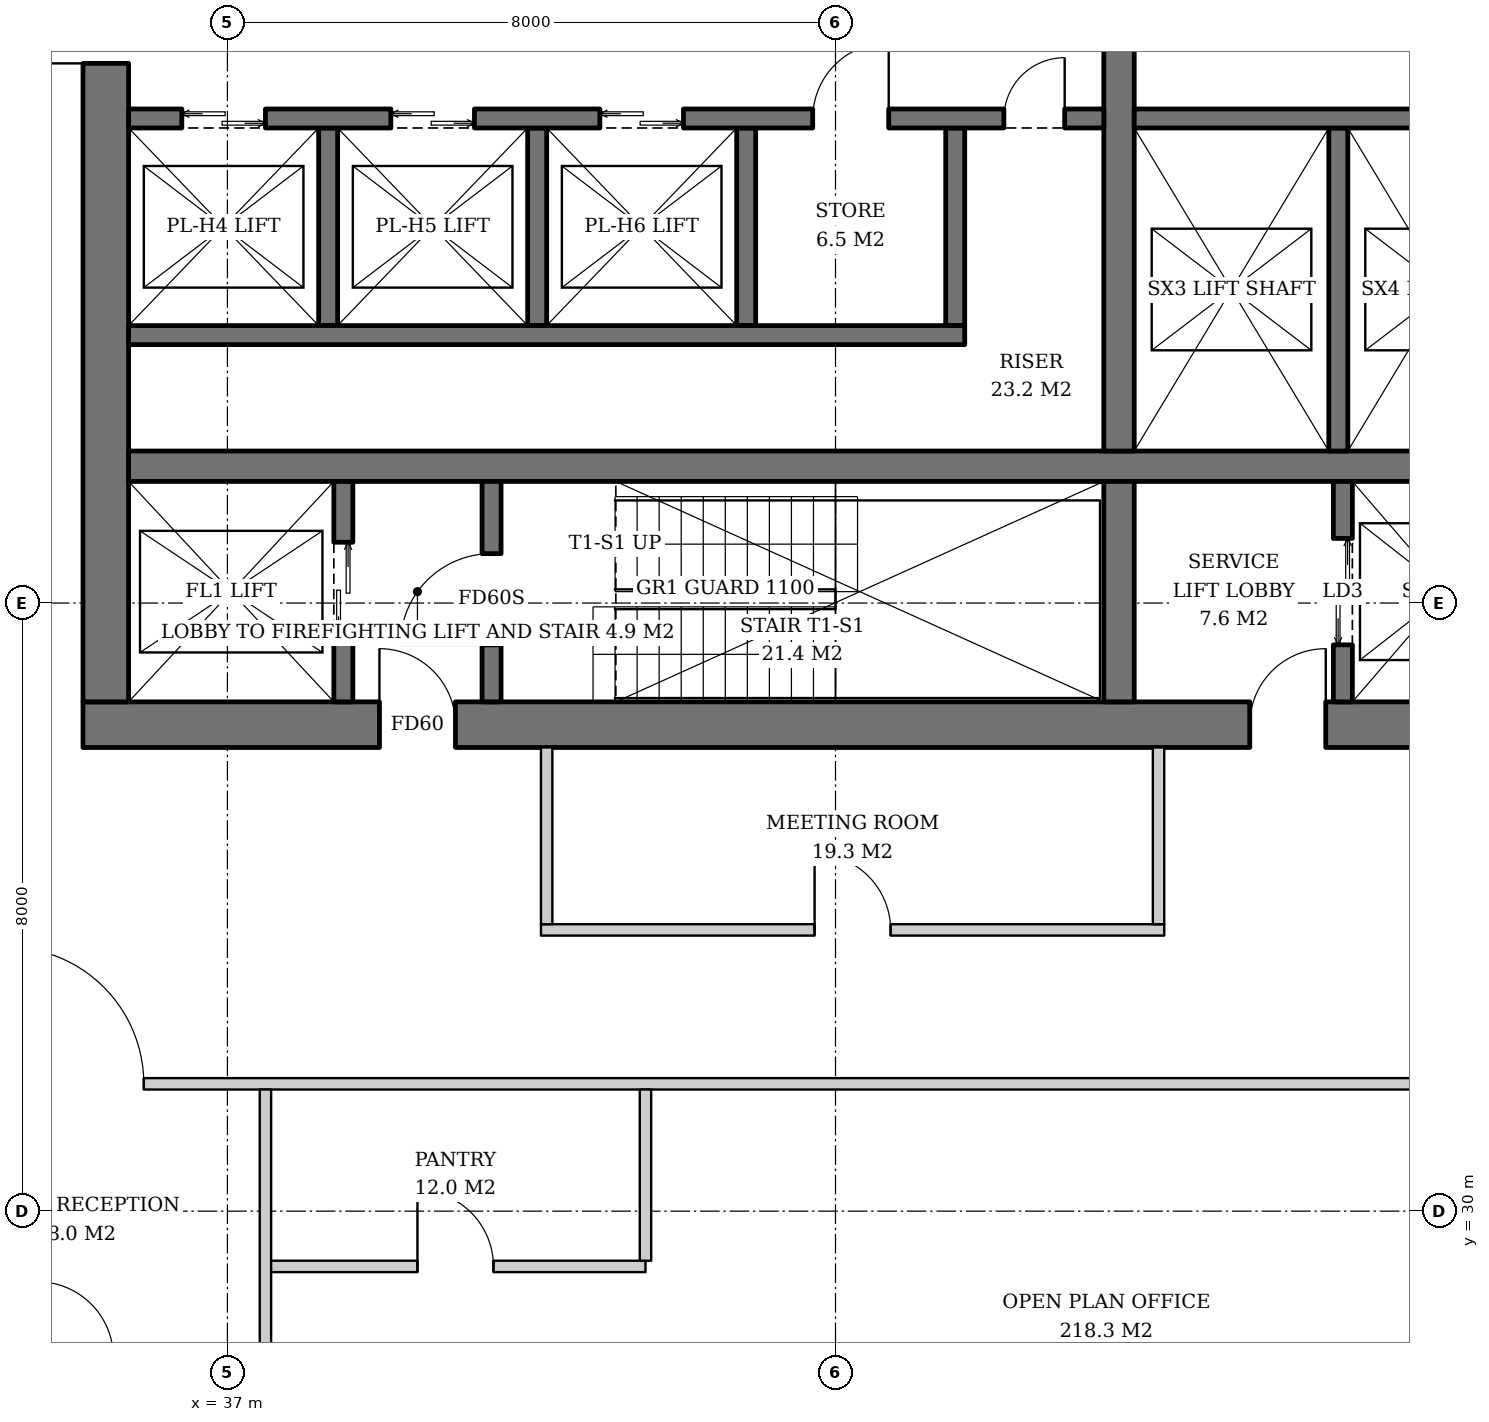
"""IFC4 building model, lengths in metres.
Left out: names, types, materials, properties, quantities, classifications, styles, units other than length and angle.
Written with IfcOpenShell. Run it as: python <this file> out.ifc"""

import sys

from ifc_helpers import new_model, si_unit, direction, frame, frame_2d, origin, place, context, subcontext, project, spatial, rectangle, extrude, element, fill, save


model = new_model("IFC4")
c1 = context("Model", 3, precision=1e-05, world=origin(), true_north=direction((0.0, 1.0)))
c2 = subcontext(c1, "Body", "Model", "MODEL_VIEW")
j1 = project(units=[si_unit("LENGTHUNIT", "METRE"), si_unit("PLANEANGLEUNIT", "RADIAN")], contexts=[c1])
p1 = place(None, origin())
s1 = spatial("IfcSite", under=j1, at=p1, CompositionType="ELEMENT")
p2 = place(p1, origin())
s2 = spatial("IfcBuilding", under=s1, at=p2, CompositionType="ELEMENT")
p3 = place(p2, frame((0.0, 0.0, 173.0)))
s3 = spatial("IfcBuildingStorey", under=s2, at=p3, CompositionType="ELEMENT", Elevation=173.0)
p4 = place(p3, frame((35.1, 36.4, 0.0), z_axis=(0.0, 0.0, 1.0), x_axis=(1.0, 0.0, 0.0)))
e1 = element("IfcWall", 1, at=p4, inside=s3, PredefinedType="SHEAR", context=c2, shape_type="SweptSolid", body=[
    extrude(rectangle(XDim=19.8, YDim=0.6, at=frame_2d((9.9, 0.0))), origin(), (0.0, 0.0, 1.0), 3.8),
])
p5 = place(p4, frame((3.9, 0.0, 0.0)))
e2 = element("IfcOpeningElement", 2, at=p5, cuts=e1, PredefinedType="OPENING", context=c2, shape_type="SweptSolid", body=[
    extrude(rectangle(XDim=1.0, YDim=2.1, at=frame_2d((0.5, 1.05))), frame((0.0, 0.31, 0.0), z_axis=(0.0, -1.0, 0.0), x_axis=(1.0, 0.0, 0.0)), (0.0, 0.0, 1.0), 0.62),
])
p6 = place(p4, frame((15.35, 0.0, 0.0)))
e3 = element("IfcOpeningElement", 3, at=p6, cuts=e1, PredefinedType="OPENING", context=c2, shape_type="SweptSolid", body=[
    extrude(rectangle(XDim=1.0, YDim=2.1, at=frame_2d((0.5, 1.05))), frame((0.0, 0.31, 0.0), z_axis=(0.0, -1.0, 0.0), x_axis=(1.0, 0.0, 0.0)), (0.0, 0.0, 1.0), 0.62),
])
p7 = place(p3, frame((35.4, 36.7, 0.0), z_axis=(0.0, 0.0, 1.0), x_axis=(0.0, 1.0, 0.0)))
e4 = element("IfcWall", 4, at=p7, inside=s3, PredefinedType="SHEAR", context=c2, shape_type="SweptSolid", body=[
    extrude(rectangle(XDim=18.6, YDim=0.6, at=frame_2d((9.3, 0.0))), origin(), (0.0, 0.0, 1.0), 3.8),
])
p8 = place(p7, frame((8.4, 0.0, 0.0)))
e5 = element("IfcOpeningElement", 5, at=p8, cuts=e4, PredefinedType="OPENING", context=c2, shape_type="SweptSolid", body=[
    extrude(rectangle(XDim=1.8, YDim=2.4, at=frame_2d((0.9, 1.2))), frame((0.0, 0.31, 0.0), z_axis=(0.0, -1.0, 0.0), x_axis=(1.0, 0.0, 0.0)), (0.0, 0.0, 1.0), 0.62),
])
p9 = place(p3, frame((35.7, 39.8, 0.0), z_axis=(0.0, 0.0, 1.0), x_axis=(1.0, 0.0, 0.0)))
e6 = element("IfcWall", 6, at=p9, inside=s3, PredefinedType="SHEAR", context=c2, shape_type="SweptSolid", body=[
    extrude(rectangle(XDim=18.6, YDim=0.4, at=frame_2d((9.3, 0.0))), origin(), (0.0, 0.0, 1.0), 3.8),
])
p10 = place(p3, frame((48.73, 36.7, 0.0), z_axis=(0.0, 0.0, 1.0), x_axis=(0.0, 1.0, 0.0)))
e7 = element("IfcWall", 7, at=p10, inside=s3, PredefinedType="SHEAR", context=c2, shape_type="SweptSolid", body=[
    extrude(rectangle(XDim=2.9, YDim=0.4, at=frame_2d((1.45, 0.0))), origin(), (0.0, 0.0, 1.0), 3.8),
])
p11 = place(p3, frame((48.73, 40.0, 0.0), z_axis=(0.0, 0.0, 1.0), x_axis=(0.0, 1.0, 0.0)))
e8 = element("IfcWall", 8, at=p11, inside=s3, PredefinedType="SHEAR", context=c2, shape_type="SweptSolid", body=[
    extrude(rectangle(XDim=12.0, YDim=0.4, at=frame_2d((6.0, 0.0))), origin(), (0.0, 0.0, 1.0), 3.8),
])
p12 = place(p3, frame((38.525, 36.7, 0.0), z_axis=(0.0, 0.0, 1.0), x_axis=(0.0, 1.0, 0.0)))
e9 = element("IfcWall", 9, at=p12, inside=s3, PredefinedType="SHEAR", context=c2, shape_type="SweptSolid", body=[
    extrude(rectangle(XDim=2.9, YDim=0.25, at=frame_2d((1.45, 0.0))), origin(), (0.0, 0.0, 1.0), 3.8),
])
p13 = place(p12, frame((0.8, 0.0, 0.0)))
e10 = element("IfcOpeningElement", 10, at=p13, cuts=e9, PredefinedType="OPENING", context=c2, shape_type="SweptSolid", body=[
    extrude(rectangle(XDim=1.3, YDim=2.2, at=frame_2d((0.65, 1.1))), frame((0.0, 0.135, 0.0), z_axis=(0.0, -1.0, 0.0), x_axis=(1.0, 0.0, 0.0)), (0.0, 0.0, 1.0), 0.27),
])
p14 = place(p3, frame((40.475, 36.7, 0.0), z_axis=(0.0, 0.0, 1.0), x_axis=(0.0, 1.0, 0.0)))
e11 = element("IfcWall", 11, at=p14, inside=s3, PredefinedType="SHEAR", context=c2, shape_type="SweptSolid", body=[
    extrude(rectangle(XDim=2.9, YDim=0.25, at=frame_2d((1.45, 0.0))), origin(), (0.0, 0.0, 1.0), 3.8),
])
p15 = place(p14, frame((0.75, 0.0, 0.0)))
e12 = element("IfcOpeningElement", 12, at=p15, cuts=e11, PredefinedType="OPENING", context=c2, shape_type="SweptSolid", body=[
    extrude(rectangle(XDim=1.2, YDim=2.1, at=frame_2d((0.6, 1.05))), frame((0.0, 0.135, 0.0), z_axis=(0.0, -1.0, 0.0), x_axis=(1.0, 0.0, 0.0)), (0.0, 0.0, 1.0), 0.27),
])
p16 = place(p3, frame((51.675, 36.7, 0.0), z_axis=(0.0, 0.0, 1.0), x_axis=(0.0, 1.0, 0.0)))
e13 = element("IfcWall", 13, at=p16, inside=s3, PredefinedType="SHEAR", context=c2, shape_type="SweptSolid", body=[
    extrude(rectangle(XDim=2.9, YDim=0.25, at=frame_2d((1.45, 0.0))), origin(), (0.0, 0.0, 1.0), 3.8),
])
p17 = place(p16, frame((0.75, 0.0, 0.0)))
e14 = element("IfcOpeningElement", 14, at=p17, cuts=e13, PredefinedType="OPENING", context=c2, shape_type="SweptSolid", body=[
    extrude(rectangle(XDim=1.4, YDim=2.4, at=frame_2d((0.7, 1.2))), frame((0.0, 0.135, 0.0), z_axis=(0.0, -1.0, 0.0), x_axis=(1.0, 0.0, 0.0)), (0.0, 0.0, 1.0), 0.27),
])
for number, where, z_axis, x_axis in (
    (15, (38.325, 44.25, 0.0), (0.0, 0.0, 1.0), (0.0, -1.0, 0.0)),
    (16, (41.075, 44.25, 0.0), (0.0, 0.0, 1.0), (0.0, -1.0, 0.0)),
    (17, (43.825, 44.25, 0.0), (0.0, 0.0, 1.0), (0.0, -1.0, 0.0)),
    (18, (46.575, 44.25, 0.0), (0.0, 0.0, 1.0), (0.0, -1.0, 0.0)),
):
    element("IfcWall", number, at=place(p3, frame(where, z_axis=z_axis, x_axis=x_axis)), inside=s3, PredefinedType="SHEAR", context=c2, shape_type="SweptSolid", body=[
        extrude(rectangle(XDim=2.6, YDim=0.25, at=frame_2d((1.3, 0.0))), origin(), (0.0, 0.0, 1.0), 3.8),
    ])
p18 = place(p3, frame((35.7, 41.525, 0.0), z_axis=(0.0, 0.0, 1.0), x_axis=(1.0, 0.0, 0.0)))
e19 = element("IfcWall", 19, at=p18, inside=s3, PredefinedType="SHEAR", context=c2, shape_type="SweptSolid", body=[
    extrude(rectangle(XDim=11.0, YDim=0.25, at=frame_2d((5.5, 0.0))), origin(), (0.0, 0.0, 1.0), 3.8),
])
p19 = place(p3, frame((35.7, 44.375, 0.0), z_axis=(0.0, 0.0, 1.0), x_axis=(1.0, 0.0, 0.0)))
e20 = element("IfcWall", 20, at=p19, inside=s3, PredefinedType="SHEAR", context=c2, shape_type="SweptSolid", body=[
    extrude(rectangle(XDim=12.83, YDim=0.25, at=frame_2d((6.415, 0.0))), origin(), (0.0, 0.0, 1.0), 3.8),
])
p20 = place(p19, frame((0.7, 0.0, 0.0)))
e21 = element("IfcOpeningElement", 21, at=p20, cuts=e20, PredefinedType="OPENING", context=c2, shape_type="SweptSolid", body=[
    extrude(rectangle(XDim=1.1, YDim=2.2, at=frame_2d((0.55, 1.1))), frame((0.0, 0.135, 0.0), z_axis=(0.0, -1.0, 0.0), x_axis=(1.0, 0.0, 0.0)), (0.0, 0.0, 1.0), 0.27),
])
p21 = place(p19, frame((3.45, 0.0, 0.0)))
e22 = element("IfcOpeningElement", 22, at=p21, cuts=e20, PredefinedType="OPENING", context=c2, shape_type="SweptSolid", body=[
    extrude(rectangle(XDim=1.1, YDim=2.2, at=frame_2d((0.55, 1.1))), frame((0.0, 0.135, 0.0), z_axis=(0.0, -1.0, 0.0), x_axis=(1.0, 0.0, 0.0)), (0.0, 0.0, 1.0), 0.27),
])
p22 = place(p19, frame((6.2, 0.0, 0.0)))
e23 = element("IfcOpeningElement", 23, at=p22, cuts=e20, PredefinedType="OPENING", context=c2, shape_type="SweptSolid", body=[
    extrude(rectangle(XDim=1.1, YDim=2.2, at=frame_2d((0.55, 1.1))), frame((0.0, 0.135, 0.0), z_axis=(0.0, -1.0, 0.0), x_axis=(1.0, 0.0, 0.0)), (0.0, 0.0, 1.0), 0.27),
])
p23 = place(p19, frame((9.0, 0.0, 0.0)))
e24 = element("IfcOpeningElement", 24, at=p23, cuts=e20, PredefinedType="OPENING", context=c2, shape_type="SweptSolid", body=[
    extrude(rectangle(XDim=1.0, YDim=2.1, at=frame_2d((0.5, 1.05))), frame((0.0, 0.135, 0.0), z_axis=(0.0, -1.0, 0.0), x_axis=(1.0, 0.0, 0.0)), (0.0, 0.0, 1.0), 0.27),
])
p24 = place(p19, frame((11.515, 0.0, 0.0)))
e25 = element("IfcOpeningElement", 25, at=p24, cuts=e20, PredefinedType="OPENING", context=c2, shape_type="SweptSolid", body=[
    extrude(rectangle(XDim=0.8, YDim=2.0, at=frame_2d((0.4, 1.0))), frame((0.0, 0.135, 0.0), z_axis=(0.0, -1.0, 0.0), x_axis=(1.0, 0.0, 0.0)), (0.0, 0.0, 1.0), 0.27),
])
p25 = place(p3, frame((51.615, 44.25, 0.0), z_axis=(0.0, 0.0, 1.0), x_axis=(0.0, -1.0, 0.0)))
e26 = element("IfcWall", 26, at=p25, inside=s3, PredefinedType="SHEAR", context=c2, shape_type="SweptSolid", body=[
    extrude(rectangle(XDim=4.25, YDim=0.25, at=frame_2d((2.125, 0.0))), origin(), (0.0, 0.0, 1.0), 3.8),
])
p26 = place(p3, frame((48.93, 44.375, 0.0), z_axis=(0.0, 0.0, 1.0), x_axis=(1.0, 0.0, 0.0)))
e27 = element("IfcWall", 27, at=p26, inside=s3, PredefinedType="SHEAR", context=c2, shape_type="SweptSolid", body=[
    extrude(rectangle(XDim=5.37, YDim=0.25, at=frame_2d((2.685, 0.0))), origin(), (0.0, 0.0, 1.0), 3.8),
])
p27 = place(p3, frame((41.125, 33.7, 0.0), z_axis=(0.0, 0.0, 1.0), x_axis=(1.0, 0.0, 0.0)))
e28 = element("IfcWall", 28, at=p27, inside=s3, PredefinedType="PARTITIONING", context=c2, shape_type="SweptSolid", body=[
    extrude(rectangle(XDim=8.2, YDim=0.15, at=frame_2d((4.1, 0.0))), origin(), (0.0, 0.0, 1.0), 2.867),
])
p28 = place(p27, frame((3.6, 0.0, 0.0)))
e29 = element("IfcOpeningElement", 29, at=p28, cuts=e28, PredefinedType="OPENING", context=c2, shape_type="SweptSolid", body=[
    extrude(rectangle(XDim=1.0, YDim=2.1, at=frame_2d((0.5, 1.05))), frame((0.0, 0.085, 0.0), z_axis=(0.0, -1.0, 0.0), x_axis=(1.0, 0.0, 0.0)), (0.0, 0.0, 1.0), 0.17),
])
for number, where, z_axis, x_axis in (
    (30, (41.2, 36.1, 0.0), (0.0, 0.0, 1.0), (0.0, -1.0, 0.0)),
    (31, (49.25, 36.1, 0.0), (0.0, 0.0, 1.0), (0.0, -1.0, 0.0)),
):
    element("IfcWall", number, at=place(p3, frame(where, z_axis=z_axis, x_axis=x_axis)), inside=s3, PredefinedType="PARTITIONING", context=c2, shape_type="SweptSolid", body=[
        extrude(rectangle(XDim=2.325, YDim=0.15, at=frame_2d((1.163, 0.0))), origin(), (0.0, 0.0, 1.0), 3.62),
    ])
p29 = place(p3, frame((30.971, 31.675, 0.0), z_axis=(0.0, 0.0, 1.0), x_axis=(1.0, 0.0, 0.0)))
e32 = element("IfcWall", 32, at=p29, inside=s3, PredefinedType="PARTITIONING", context=c2, shape_type="SweptSolid", body=[
    extrude(rectangle(XDim=28.057, YDim=0.15, at=frame_2d((14.029, 0.0))), origin(), (0.0, 0.0, 1.0), 2.867),
])
p30 = place(p29, frame((3.129, 0.0, 0.0)))
e33 = element("IfcOpeningElement", 33, at=p30, cuts=e32, PredefinedType="OPENING", context=c2, shape_type="SweptSolid", body=[
    extrude(rectangle(XDim=1.8, YDim=2.4, at=frame_2d((0.9, 1.2))), frame((0.0, 0.085, 0.0), z_axis=(0.0, -1.0, 0.0), x_axis=(1.0, 0.0, 0.0)), (0.0, 0.0, 1.0), 0.17),
])
p31 = place(p3, frame((37.5, 29.273, 0.0), z_axis=(0.0, 0.0, 1.0), x_axis=(1.0, 0.0, 0.0)))
e34 = element("IfcWall", 34, at=p31, inside=s3, PredefinedType="PARTITIONING", context=c2, shape_type="SweptSolid", body=[
    extrude(rectangle(XDim=5.0, YDim=0.15, at=frame_2d((2.5, 0.0))), origin(), (0.0, 0.0, 1.0), 2.867),
])
p32 = place(p31, frame((2.0, 0.0, 0.0)))
e35 = element("IfcOpeningElement", 35, at=p32, cuts=e34, PredefinedType="OPENING", context=c2, shape_type="SweptSolid", body=[
    extrude(rectangle(XDim=1.0, YDim=2.1, at=frame_2d((0.5, 1.05))), frame((0.0, 0.085, 0.0), z_axis=(0.0, -1.0, 0.0), x_axis=(1.0, 0.0, 0.0)), (0.0, 0.0, 1.0), 0.17),
])
p33 = place(p3, frame((37.5, 31.6, 0.0), z_axis=(0.0, 0.0, 1.0), x_axis=(0.0, -1.0, 0.0)))
e36 = element("IfcWall", 36, at=p33, inside=s3, PredefinedType="PARTITIONING", context=c2, shape_type="SweptSolid", body=[
    extrude(rectangle(XDim=3.454, YDim=0.15, at=frame_2d((1.727, 0.0))), origin(), (0.0, 0.0, 1.0), 3.62),
])
p34 = place(p3, frame((42.5, 31.6, 0.0), z_axis=(0.0, 0.0, 1.0), x_axis=(0.0, -1.0, 0.0)))
e37 = element("IfcWall", 37, at=p34, inside=s3, PredefinedType="PARTITIONING", context=c2, shape_type="SweptSolid", body=[
    extrude(rectangle(XDim=2.252, YDim=0.15, at=frame_2d((1.126, 0.0))), origin(), (0.0, 0.0, 1.0), 3.62),
])
p35 = place(p13, origin())
e38 = element("IfcDoor", 38, at=p35, inside=s3, OperationType="DOUBLE_DOOR_SLIDING", PredefinedType="DOOR", context=c2, shape_type="SweptSolid", body=[
    extrude(rectangle(XDim=1.3, YDim=2.2, at=frame_2d((0.65, 1.1))), frame((0.0, 0.025, 0.0), z_axis=(0.0, -1.0, 0.0), x_axis=(1.0, 0.0, 0.0)), (0.0, 0.0, 1.0), 0.05),
])
fill(e10, e38)
p36 = place(p15, origin())
e39 = element("IfcDoor", 39, at=p36, inside=s3, OperationType="SINGLE_SWING_LEFT", PredefinedType="DOOR", context=c2, shape_type="SweptSolid", body=[
    extrude(rectangle(XDim=1.2, YDim=2.1, at=frame_2d((0.6, 1.05))), frame((0.0, 0.025, 0.0), z_axis=(0.0, -1.0, 0.0), x_axis=(1.0, 0.0, 0.0)), (0.0, 0.0, 1.0), 0.05),
])
fill(e12, e39)
p37 = place(p17, origin())
e40 = element("IfcDoor", 40, at=p37, inside=s3, OperationType="DOUBLE_DOOR_SLIDING", PredefinedType="DOOR", context=c2, shape_type="SweptSolid", body=[
    extrude(rectangle(XDim=1.4, YDim=2.4, at=frame_2d((0.7, 1.2))), frame((0.0, 0.025, 0.0), z_axis=(0.0, -1.0, 0.0), x_axis=(1.0, 0.0, 0.0)), (0.0, 0.0, 1.0), 0.05),
])
fill(e14, e40)
p38 = place(p20, origin())
e41 = element("IfcDoor", 41, at=p38, inside=s3, OperationType="DOUBLE_DOOR_SLIDING", PredefinedType="DOOR", context=c2, shape_type="SweptSolid", body=[
    extrude(rectangle(XDim=1.1, YDim=2.2, at=frame_2d((0.55, 1.1))), frame((0.0, 0.025, 0.0), z_axis=(0.0, -1.0, 0.0), x_axis=(1.0, 0.0, 0.0)), (0.0, 0.0, 1.0), 0.05),
])
fill(e21, e41)
p39 = place(p21, origin())
e42 = element("IfcDoor", 42, at=p39, inside=s3, OperationType="DOUBLE_DOOR_SLIDING", PredefinedType="DOOR", context=c2, shape_type="SweptSolid", body=[
    extrude(rectangle(XDim=1.1, YDim=2.2, at=frame_2d((0.55, 1.1))), frame((0.0, 0.025, 0.0), z_axis=(0.0, -1.0, 0.0), x_axis=(1.0, 0.0, 0.0)), (0.0, 0.0, 1.0), 0.05),
])
fill(e22, e42)
p40 = place(p22, origin())
e43 = element("IfcDoor", 43, at=p40, inside=s3, OperationType="DOUBLE_DOOR_SLIDING", PredefinedType="DOOR", context=c2, shape_type="SweptSolid", body=[
    extrude(rectangle(XDim=1.1, YDim=2.2, at=frame_2d((0.55, 1.1))), frame((0.0, 0.025, 0.0), z_axis=(0.0, -1.0, 0.0), x_axis=(1.0, 0.0, 0.0)), (0.0, 0.0, 1.0), 0.05),
])
fill(e23, e43)
p41 = place(p23, origin())
e44 = element("IfcDoor", 44, at=p41, inside=s3, OperationType="SINGLE_SWING_RIGHT", PredefinedType="DOOR", context=c2, shape_type="SweptSolid", body=[
    extrude(rectangle(XDim=1.0, YDim=2.1, at=frame_2d((0.5, 1.05))), frame((0.0, 0.025, 0.0), z_axis=(0.0, -1.0, 0.0), x_axis=(1.0, 0.0, 0.0)), (0.0, 0.0, 1.0), 0.05),
])
fill(e24, e44)
p42 = place(p24, origin())
e45 = element("IfcDoor", 45, at=p42, inside=s3, OperationType="SINGLE_SWING_RIGHT", PredefinedType="DOOR", context=c2, shape_type="SweptSolid", body=[
    extrude(rectangle(XDim=0.8, YDim=2.0, at=frame_2d((0.4, 1.0))), frame((0.0, 0.025, 0.0), z_axis=(0.0, -1.0, 0.0), x_axis=(1.0, 0.0, 0.0)), (0.0, 0.0, 1.0), 0.05),
])
fill(e25, e45)
p43 = place(p5, origin())
e46 = element("IfcDoor", 46, at=p43, inside=s3, OperationType="SINGLE_SWING_LEFT", PredefinedType="DOOR", context=c2, shape_type="SweptSolid", body=[
    extrude(rectangle(XDim=1.0, YDim=2.1, at=frame_2d((0.5, 1.05))), frame((0.0, 0.025, 0.0), z_axis=(0.0, -1.0, 0.0), x_axis=(1.0, 0.0, 0.0)), (0.0, 0.0, 1.0), 0.05),
])
fill(e2, e46)
p44 = place(p8, origin())
e47 = element("IfcDoor", 47, at=p44, inside=s3, OperationType="DOUBLE_DOOR_SINGLE_SWING", PredefinedType="DOOR", context=c2, shape_type="SweptSolid", body=[
    extrude(rectangle(XDim=1.8, YDim=2.4, at=frame_2d((0.9, 1.2))), frame((0.0, 0.025, 0.0), z_axis=(0.0, -1.0, 0.0), x_axis=(1.0, 0.0, 0.0)), (0.0, 0.0, 1.0), 0.05),
])
fill(e5, e47)
p45 = place(p6, origin())
e48 = element("IfcDoor", 48, at=p45, inside=s3, OperationType="SINGLE_SWING_RIGHT", PredefinedType="DOOR", context=c2, shape_type="SweptSolid", body=[
    extrude(rectangle(XDim=1.0, YDim=2.1, at=frame_2d((0.5, 1.05))), frame((0.0, 0.025, 0.0), z_axis=(0.0, -1.0, 0.0), x_axis=(1.0, 0.0, 0.0)), (0.0, 0.0, 1.0), 0.05),
])
fill(e3, e48)
p46 = place(p28, origin())
e49 = element("IfcDoor", 49, at=p46, inside=s3, OperationType="SINGLE_SWING_LEFT", PredefinedType="DOOR", context=c2, shape_type="SweptSolid", body=[
    extrude(rectangle(XDim=1.0, YDim=2.1, at=frame_2d((0.5, 1.05))), frame((0.0, 0.025, 0.0), z_axis=(0.0, -1.0, 0.0), x_axis=(1.0, 0.0, 0.0)), (0.0, 0.0, 1.0), 0.05),
])
fill(e29, e49)
p47 = place(p30, origin())
e50 = element("IfcDoor", 50, at=p47, inside=s3, OperationType="DOUBLE_DOOR_SINGLE_SWING", PredefinedType="DOOR", context=c2, shape_type="SweptSolid", body=[
    extrude(rectangle(XDim=1.8, YDim=2.4, at=frame_2d((0.9, 1.2))), frame((0.0, 0.025, 0.0), z_axis=(0.0, -1.0, 0.0), x_axis=(1.0, 0.0, 0.0)), (0.0, 0.0, 1.0), 0.05),
])
fill(e33, e50)
p48 = place(p32, origin())
e51 = element("IfcDoor", 51, at=p48, inside=s3, OperationType="SINGLE_SWING_LEFT", PredefinedType="DOOR", context=c2, shape_type="SweptSolid", body=[
    extrude(rectangle(XDim=1.0, YDim=2.1, at=frame_2d((0.5, 1.05))), frame((0.0, 0.025, 0.0), z_axis=(0.0, -1.0, 0.0), x_axis=(1.0, 0.0, 0.0)), (0.0, 0.0, 1.0), 0.05),
])
fill(e35, e51)
save(model, sys.argv[1])
